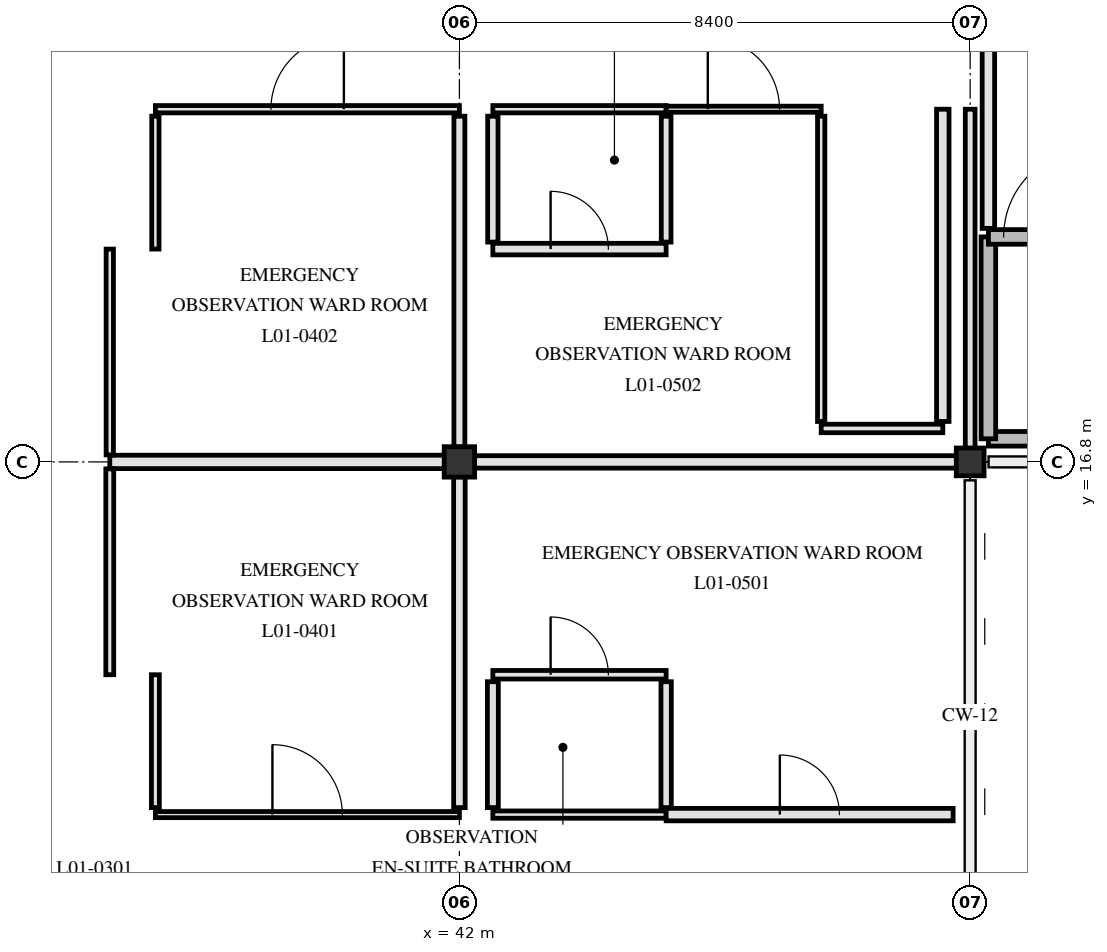
"""IFC4 building model, lengths in metres.
Left out: names, types, materials, properties, quantities, classifications, styles, units other than length and angle.
Written with IfcOpenShell. Run it as: python <this file> out.ifc"""

import sys

from ifc_helpers import new_model, si_unit, direction, frame, frame_2d, origin, origin_2d, place, context, subcontext, project, spatial, rectangle, hollow_circle, extrude, element, fill, save


model = new_model("IFC4")
c1 = context("Model", 3, precision=1e-05, world=origin(), true_north=direction((0.0, 1.0)))
c2 = subcontext(c1, "Body", "Model", "MODEL_VIEW")
j1 = project(units=[si_unit("LENGTHUNIT", "METRE"), si_unit("PLANEANGLEUNIT", "RADIAN")], contexts=[c1])
p1 = place(None, origin())
s1 = spatial("IfcSite", under=j1, at=p1, CompositionType="ELEMENT")
p2 = place(p1, origin())
s2 = spatial("IfcBuilding", under=s1, at=p2, CompositionType="ELEMENT")
p3 = place(p2, frame((0.0, 0.0, 4.8)))
s3 = spatial("IfcBuildingStorey", under=s2, at=p3, CompositionType="ELEMENT", Elevation=4.8)
p4 = place(p3, frame((42.0, 16.8, 0.0), z_axis=(0.0, 0.0, 1.0), x_axis=(1.0, 0.0, 0.0)))
e1 = element("IfcColumn", 1, at=p4, inside=s3, PredefinedType="COLUMN", context=c2, shape_type="SweptSolid", body=[
    extrude(rectangle(XDim=0.5, YDim=0.5, at=origin_2d()), origin(), (0.0, 0.0, 1.0), 4.5),
])
p5 = place(p3, frame((50.4, 16.8, 0.0), z_axis=(0.0, 0.0, 1.0), x_axis=(1.0, 0.0, 0.0)))
e2 = element("IfcColumn", 2, at=p5, inside=s3, PredefinedType="COLUMN", context=c2, shape_type="SweptSolid", body=[
    extrude(hollow_circle(Radius=0.229, WallThickness=0.02, at=origin_2d()), origin(), (0.0, 0.0, 1.0), 4.5),
])
p6 = place(p3, frame((50.7, 17.18, 0.0), z_axis=(0.0, 0.0, 1.0), x_axis=(1.0, 0.0, 0.0)))
e3 = element("IfcWall", 3, at=p6, inside=s3, PredefinedType="SHEAR", context=c2, shape_type="SweptSolid", body=[
    extrude(rectangle(XDim=7.82, YDim=0.24, at=frame_2d((3.91, 0.0))), origin(), (0.0, 0.0, 1.0), 4.15),
])
p7 = place(p3, frame((50.7, 17.18, 0.0), z_axis=(0.0, 0.0, 1.0), x_axis=(0.0, 1.0, 0.0)))
e4 = element("IfcWall", 4, at=p7, inside=s3, PredefinedType="SHEAR", context=c2, shape_type="SweptSolid", body=[
    extrude(rectangle(XDim=3.32, YDim=0.24, at=frame_2d((1.66, 0.0))), origin(), (0.0, 0.0, 1.0), 4.15),
])
p8 = place(p3, frame((50.7, 20.5, 0.0), z_axis=(0.0, 0.0, 1.0), x_axis=(1.0, 0.0, 0.0)))
e5 = element("IfcWall", 5, at=p8, inside=s3, PredefinedType="SHEAR", context=c2, shape_type="SweptSolid", body=[
    extrude(rectangle(XDim=7.82, YDim=0.24, at=frame_2d((3.91, 0.0))), origin(), (0.0, 0.0, 1.0), 4.15),
])
p9 = place(p8, frame((0.25, 0.0, 0.0)))
e6 = element("IfcOpeningElement", 6, at=p9, cuts=e5, PredefinedType="OPENING", context=c2, shape_type="SweptSolid", body=[
    extrude(rectangle(XDim=1.45, YDim=2.2, at=frame_2d((0.725, 1.1))), frame((0.0, 0.13, 0.0), z_axis=(0.0, -1.0, 0.0), x_axis=(1.0, 0.0, 0.0)), (0.0, 0.0, 1.0), 0.26),
])
p10 = place(p3, frame((50.7, 20.64, 0.0), z_axis=(0.0, 0.0, 1.0), x_axis=(0.0, 1.0, 0.0)))
e7 = element("IfcWall", 7, at=p10, inside=s3, PredefinedType="PARTITIONING", context=c2, shape_type="SweptSolid", body=[
    extrude(rectangle(XDim=4.12, YDim=0.205, at=frame_2d((2.06, 0.0))), origin(), (0.0, 0.0, 1.0), 4.14),
])
p11 = place(p3, frame((37.0, 11.0, 0.0), z_axis=(0.0, 0.0, 1.0), x_axis=(1.0, 0.0, 0.0)))
e8 = element("IfcWall", 8, at=p11, inside=s3, PredefinedType="PARTITIONING", context=c2, shape_type="SweptSolid", body=[
    extrude(rectangle(XDim=5.0, YDim=0.1, at=frame_2d((2.5, 0.0))), origin(), (0.0, 0.0, 1.0), 3.59),
])
p12 = place(p11, frame((1.925, 0.0, 0.0)))
e9 = element("IfcOpeningElement", 9, at=p12, cuts=e8, PredefinedType="OPENING", context=c2, shape_type="SweptSolid", body=[
    extrude(rectangle(XDim=1.15, YDim=2.15, at=frame_2d((0.575, 1.075))), frame((0.0, 0.06, 0.0), z_axis=(0.0, -1.0, 0.0), x_axis=(1.0, 0.0, 0.0)), (0.0, 0.0, 1.0), 0.12),
])
p13 = place(p3, frame((42.55, 11.0, 0.0), z_axis=(0.0, 0.0, 1.0), x_axis=(1.0, 0.0, 0.0)))
e10 = element("IfcWall", 10, at=p13, inside=s3, PredefinedType="PARTITIONING", context=c2, shape_type="SweptSolid", body=[
    extrude(rectangle(XDim=2.85, YDim=0.12, at=frame_2d((1.425, 0.0))), origin(), (0.0, 0.0, 1.0), 4.14),
])
p14 = place(p3, frame((45.4, 11.0, 0.0), z_axis=(0.0, 0.0, 1.0), x_axis=(1.0, 0.0, 0.0)))
e11 = element("IfcWall", 11, at=p14, inside=s3, PredefinedType="PARTITIONING", context=c2, shape_type="SweptSolid", body=[
    extrude(rectangle(XDim=4.72, YDim=0.205, at=frame_2d((2.36, 0.0))), origin(), (0.0, 0.0, 1.0), 4.14),
])
p15 = place(p14, frame((1.87, 0.0, 0.0)))
e12 = element("IfcOpeningElement", 12, at=p15, cuts=e11, PredefinedType="OPENING", context=c2, shape_type="SweptSolid", body=[
    extrude(rectangle(XDim=0.98, YDim=2.12, at=frame_2d((0.49, 1.06))), frame((0.0, 0.113, 0.0), z_axis=(0.0, -1.0, 0.0), x_axis=(1.0, 0.0, 0.0)), (0.0, 0.0, 1.0), 0.225),
])
p16 = place(p3, frame((42.55, 13.3, 0.0), z_axis=(0.0, 0.0, 1.0), x_axis=(1.0, 0.0, 0.0)))
e13 = element("IfcWall", 13, at=p16, inside=s3, PredefinedType="PARTITIONING", context=c2, shape_type="SweptSolid", body=[
    extrude(rectangle(XDim=2.85, YDim=0.14, at=frame_2d((1.425, 0.0))), origin(), (0.0, 0.0, 1.0), 4.14),
])
p17 = place(p16, frame((0.95, 0.0, 0.0)))
e14 = element("IfcOpeningElement", 14, at=p17, cuts=e13, PredefinedType="OPENING", context=c2, shape_type="SweptSolid", body=[
    extrude(rectangle(XDim=0.95, YDim=2.1, at=frame_2d((0.475, 1.05))), frame((0.0, 0.08, 0.0), z_axis=(0.0, -1.0, 0.0), x_axis=(1.0, 0.0, 0.0)), (0.0, 0.0, 1.0), 0.16),
])
p18 = place(p3, frame((36.25, 16.8, 0.0), z_axis=(0.0, 0.0, 1.0), x_axis=(1.0, 0.0, 0.0)))
e15 = element("IfcWall", 15, at=p18, inside=s3, PredefinedType="PARTITIONING", context=c2, shape_type="SweptSolid", body=[
    extrude(rectangle(XDim=5.505, YDim=0.22, at=frame_2d((2.752, 0.0))), origin(), (0.0, 0.0, 1.0), 3.54),
])
p19 = place(p3, frame((42.245, 16.8, 0.0), z_axis=(0.0, 0.0, 1.0), x_axis=(1.0, 0.0, 0.0)))
e16 = element("IfcWall", 16, at=p19, inside=s3, PredefinedType="PARTITIONING", context=c2, shape_type="SweptSolid", body=[
    extrude(rectangle(XDim=7.931, YDim=0.205, at=frame_2d((3.966, 0.0))), origin(), (0.0, 0.0, 1.0), 3.54),
])
p20 = place(p3, frame((47.95, 17.35, 0.0), z_axis=(0.0, 0.0, 1.0), x_axis=(1.0, 0.0, 0.0)))
e17 = element("IfcWall", 17, at=p20, inside=s3, PredefinedType="PARTITIONING", context=c2, shape_type="SweptSolid", body=[
    extrude(rectangle(XDim=2.0, YDim=0.14, at=frame_2d((1.0, 0.0))), origin(), (0.0, 0.0, 1.0), 4.14),
])
p21 = place(p3, frame((42.55, 20.3, 0.0), z_axis=(0.0, 0.0, 1.0), x_axis=(1.0, 0.0, 0.0)))
e18 = element("IfcWall", 18, at=p21, inside=s3, PredefinedType="PARTITIONING", context=c2, shape_type="SweptSolid", body=[
    extrude(rectangle(XDim=2.85, YDim=0.19, at=frame_2d((1.425, 0.0))), origin(), (0.0, 0.0, 1.0), 4.14),
])
p22 = place(p21, frame((0.95, 0.0, 0.0)))
e19 = element("IfcOpeningElement", 19, at=p22, cuts=e18, PredefinedType="OPENING", context=c2, shape_type="SweptSolid", body=[
    extrude(rectangle(XDim=0.95, YDim=2.1, at=frame_2d((0.475, 1.05))), frame((0.0, 0.105, 0.0), z_axis=(0.0, -1.0, 0.0), x_axis=(1.0, 0.0, 0.0)), (0.0, 0.0, 1.0), 0.21),
])
p23 = place(p3, frame((37.0, 22.6, 0.0), z_axis=(0.0, 0.0, 1.0), x_axis=(1.0, 0.0, 0.0)))
e20 = element("IfcWall", 20, at=p23, inside=s3, PredefinedType="PARTITIONING", context=c2, shape_type="SweptSolid", body=[
    extrude(rectangle(XDim=5.0, YDim=0.12, at=frame_2d((2.5, 0.0))), origin(), (0.0, 0.0, 1.0), 3.59),
])
p24 = place(p23, frame((1.9, 0.0, 0.0)))
e21 = element("IfcOpeningElement", 21, at=p24, cuts=e20, PredefinedType="OPENING", context=c2, shape_type="SweptSolid", body=[
    extrude(rectangle(XDim=1.2, YDim=2.15, at=frame_2d((0.6, 1.075))), frame((0.0, 0.07, 0.0), z_axis=(0.0, -1.0, 0.0), x_axis=(1.0, 0.0, 0.0)), (0.0, 0.0, 1.0), 0.14),
])
p25 = place(p3, frame((42.55, 22.6, 0.0), z_axis=(0.0, 0.0, 1.0), x_axis=(1.0, 0.0, 0.0)))
e22 = element("IfcWall", 22, at=p25, inside=s3, PredefinedType="PARTITIONING", context=c2, shape_type="SweptSolid", body=[
    extrude(rectangle(XDim=2.85, YDim=0.12, at=frame_2d((1.425, 0.0))), origin(), (0.0, 0.0, 1.0), 4.14),
])
p26 = place(p3, frame((45.4, 22.6, 0.0), z_axis=(0.0, 0.0, 1.0), x_axis=(1.0, 0.0, 0.0)))
e23 = element("IfcWall", 23, at=p26, inside=s3, PredefinedType="PARTITIONING", context=c2, shape_type="SweptSolid", body=[
    extrude(rectangle(XDim=2.55, YDim=0.1, at=frame_2d((1.275, 0.0))), origin(), (0.0, 0.0, 1.0), 4.14),
])
p27 = place(p26, frame((0.685, 0.0, 0.0)))
e24 = element("IfcOpeningElement", 24, at=p27, cuts=e23, PredefinedType="OPENING", context=c2, shape_type="SweptSolid", body=[
    extrude(rectangle(XDim=1.18, YDim=2.18, at=frame_2d((0.59, 1.09))), frame((0.0, 0.06, 0.0), z_axis=(0.0, -1.0, 0.0), x_axis=(1.0, 0.0, 0.0)), (0.0, 0.0, 1.0), 0.12),
])
p28 = place(p3, frame((36.25, 13.3, 0.0), z_axis=(0.0, 0.0, 1.0), x_axis=(0.0, 1.0, 0.0)))
e25 = element("IfcWall", 25, at=p28, inside=s3, PredefinedType="PARTITIONING", context=c2, shape_type="SweptSolid", body=[
    extrude(rectangle(XDim=3.385, YDim=0.13, at=frame_2d((1.692, 0.0))), origin(), (0.0, 0.0, 1.0), 3.54),
])
p29 = place(p3, frame((36.25, 16.915, 0.0), z_axis=(0.0, 0.0, 1.0), x_axis=(0.0, 1.0, 0.0)))
e26 = element("IfcWall", 26, at=p29, inside=s3, PredefinedType="PARTITIONING", context=c2, shape_type="SweptSolid", body=[
    extrude(rectangle(XDim=3.385, YDim=0.12, at=frame_2d((1.692, 0.0))), origin(), (0.0, 0.0, 1.0), 3.54),
])
p30 = place(p3, frame((37.0, 11.115, 0.0), z_axis=(0.0, 0.0, 1.0), x_axis=(0.0, 1.0, 0.0)))
e27 = element("IfcWall", 27, at=p30, inside=s3, PredefinedType="PARTITIONING", context=c2, shape_type="SweptSolid", body=[
    extrude(rectangle(XDim=2.185, YDim=0.13, at=frame_2d((1.093, 0.0))), origin(), (0.0, 0.0, 1.0), 4.14),
])
p31 = place(p3, frame((37.0, 20.3, 0.0), z_axis=(0.0, 0.0, 1.0), x_axis=(0.0, 1.0, 0.0)))
e28 = element("IfcWall", 28, at=p31, inside=s3, PredefinedType="PARTITIONING", context=c2, shape_type="SweptSolid", body=[
    extrude(rectangle(XDim=2.185, YDim=0.12, at=frame_2d((1.093, 0.0))), origin(), (0.0, 0.0, 1.0), 4.14),
])
p32 = place(p3, frame((42.0, 11.115, 0.0), z_axis=(0.0, 0.0, 1.0), x_axis=(0.0, 1.0, 0.0)))
e29 = element("IfcWall", 29, at=p32, inside=s3, PredefinedType="PARTITIONING", context=c2, shape_type="SweptSolid", body=[
    extrude(rectangle(XDim=5.44, YDim=0.19, at=frame_2d((2.72, 0.0))), origin(), (0.0, 0.0, 1.0), 3.59),
])
p33 = place(p3, frame((42.0, 17.045, 0.0), z_axis=(0.0, 0.0, 1.0), x_axis=(0.0, 1.0, 0.0)))
e30 = element("IfcWall", 30, at=p33, inside=s3, PredefinedType="PARTITIONING", context=c2, shape_type="SweptSolid", body=[
    extrude(rectangle(XDim=5.44, YDim=0.18, at=frame_2d((2.72, 0.0))), origin(), (0.0, 0.0, 1.0), 3.59),
])
p34 = place(p3, frame((42.55, 11.115, 0.0), z_axis=(0.0, 0.0, 1.0), x_axis=(0.0, 1.0, 0.0)))
e31 = element("IfcWall", 31, at=p34, inside=s3, PredefinedType="PARTITIONING", context=c2, shape_type="SweptSolid", body=[
    extrude(rectangle(XDim=2.07, YDim=0.18, at=frame_2d((1.035, 0.0))), origin(), (0.0, 0.0, 1.0), 4.14),
])
for number, where, z_axis, x_axis in (
    (32, (42.55, 20.415, 0.0), (0.0, 0.0, 1.0), (0.0, 1.0, 0.0)),
    (33, (45.4, 11.115, 0.0), (0.0, 0.0, 1.0), (0.0, 1.0, 0.0)),
):
    element("IfcWall", number, at=place(p3, frame(where, z_axis=z_axis, x_axis=x_axis)), inside=s3, PredefinedType="PARTITIONING", context=c2, shape_type="SweptSolid", body=[
        extrude(rectangle(XDim=2.07, YDim=0.17, at=frame_2d((1.035, 0.0))), origin(), (0.0, 0.0, 1.0), 4.14),
    ])
p35 = place(p3, frame((45.4, 20.415, 0.0), z_axis=(0.0, 0.0, 1.0), x_axis=(0.0, 1.0, 0.0)))
e34 = element("IfcWall", 34, at=p35, inside=s3, PredefinedType="PARTITIONING", context=c2, shape_type="SweptSolid", body=[
    extrude(rectangle(XDim=2.07, YDim=0.16, at=frame_2d((1.035, 0.0))), origin(), (0.0, 0.0, 1.0), 4.14),
])
p36 = place(p3, frame((47.95, 17.465, 0.0), z_axis=(0.0, 0.0, 1.0), x_axis=(0.0, 1.0, 0.0)))
e35 = element("IfcWall", 35, at=p36, inside=s3, PredefinedType="PARTITIONING", context=c2, shape_type="SweptSolid", body=[
    extrude(rectangle(XDim=5.02, YDim=0.12, at=frame_2d((2.51, 0.0))), origin(), (0.0, 0.0, 1.0), 4.14),
])
p37 = place(p3, frame((49.95, 17.465, 0.0), z_axis=(0.0, 0.0, 1.0), x_axis=(0.0, 1.0, 0.0)))
e36 = element("IfcWall", 36, at=p37, inside=s3, PredefinedType="PARTITIONING", context=c2, shape_type="SweptSolid", body=[
    extrude(rectangle(XDim=5.135, YDim=0.205, at=frame_2d((2.567, 0.0))), origin(), (0.0, 0.0, 1.0), 4.14),
])
p38 = place(p3, frame((50.4, 17.023, 0.0), z_axis=(0.0, 0.0, 1.0), x_axis=(0.0, 1.0, 0.0)))
e37 = element("IfcWall", 37, at=p38, inside=s3, PredefinedType="PARTITIONING", context=c2, shape_type="SweptSolid", body=[
    extrude(rectangle(XDim=5.577, YDim=0.16, at=frame_2d((2.788, 0.0))), origin(), (0.0, 0.0, 1.0), 3.74),
])
p39 = place(p9, origin())
e38 = element("IfcDoor", 38, at=p39, inside=s3, OperationType="SINGLE_SWING_RIGHT", PredefinedType="DOOR", context=c2, shape_type="SweptSolid", body=[
    extrude(rectangle(XDim=1.45, YDim=2.2, at=frame_2d((0.725, 1.1))), frame((0.0, 0.025, 0.0), z_axis=(0.0, -1.0, 0.0), x_axis=(1.0, 0.0, 0.0)), (0.0, 0.0, 1.0), 0.05),
])
fill(e6, e38)
p40 = place(p12, origin())
e39 = element("IfcDoor", 39, at=p40, inside=s3, OperationType="SINGLE_SWING_LEFT", PredefinedType="DOOR", context=c2, shape_type="SweptSolid", body=[
    extrude(rectangle(XDim=1.15, YDim=2.15, at=frame_2d((0.575, 1.075))), frame((0.0, 0.025, 0.0), z_axis=(0.0, -1.0, 0.0), x_axis=(1.0, 0.0, 0.0)), (0.0, 0.0, 1.0), 0.05),
])
fill(e9, e39)
p41 = place(p24, origin())
e40 = element("IfcDoor", 40, at=p41, inside=s3, OperationType="SINGLE_SWING_RIGHT", PredefinedType="DOOR", context=c2, shape_type="SweptSolid", body=[
    extrude(rectangle(XDim=1.2, YDim=2.15, at=frame_2d((0.6, 1.075))), frame((0.0, 0.025, 0.0), z_axis=(0.0, -1.0, 0.0), x_axis=(1.0, 0.0, 0.0)), (0.0, 0.0, 1.0), 0.05),
])
fill(e21, e40)
p42 = place(p15, origin())
e41 = element("IfcDoor", 41, at=p42, inside=s3, OperationType="SINGLE_SWING_LEFT", PredefinedType="DOOR", context=c2, shape_type="SweptSolid", body=[
    extrude(rectangle(XDim=0.98, YDim=2.12, at=frame_2d((0.49, 1.06))), frame((0.0, 0.025, 0.0), z_axis=(0.0, -1.0, 0.0), x_axis=(1.0, 0.0, 0.0)), (0.0, 0.0, 1.0), 0.05),
])
fill(e12, e41)
p43 = place(p17, origin())
e42 = element("IfcDoor", 42, at=p43, inside=s3, OperationType="SINGLE_SWING_LEFT", PredefinedType="DOOR", context=c2, shape_type="SweptSolid", body=[
    extrude(rectangle(XDim=0.95, YDim=2.1, at=frame_2d((0.475, 1.05))), frame((0.0, 0.025, 0.0), z_axis=(0.0, -1.0, 0.0), x_axis=(1.0, 0.0, 0.0)), (0.0, 0.0, 1.0), 0.05),
])
fill(e14, e42)
p44 = place(p27, origin())
e43 = element("IfcDoor", 43, at=p44, inside=s3, OperationType="SINGLE_SWING_LEFT", PredefinedType="DOOR", context=c2, shape_type="SweptSolid", body=[
    extrude(rectangle(XDim=1.18, YDim=2.18, at=frame_2d((0.59, 1.09))), frame((0.0, 0.025, 0.0), z_axis=(0.0, -1.0, 0.0), x_axis=(1.0, 0.0, 0.0)), (0.0, 0.0, 1.0), 0.05),
])
fill(e24, e43)
p45 = place(p22, origin())
e44 = element("IfcDoor", 44, at=p45, inside=s3, OperationType="SINGLE_SWING_LEFT", PredefinedType="DOOR", context=c2, shape_type="SweptSolid", body=[
    extrude(rectangle(XDim=0.95, YDim=2.1, at=frame_2d((0.475, 1.05))), frame((0.0, 0.025, 0.0), z_axis=(0.0, -1.0, 0.0), x_axis=(1.0, 0.0, 0.0)), (0.0, 0.0, 1.0), 0.05),
])
fill(e19, e44)
save(model, sys.argv[1])
